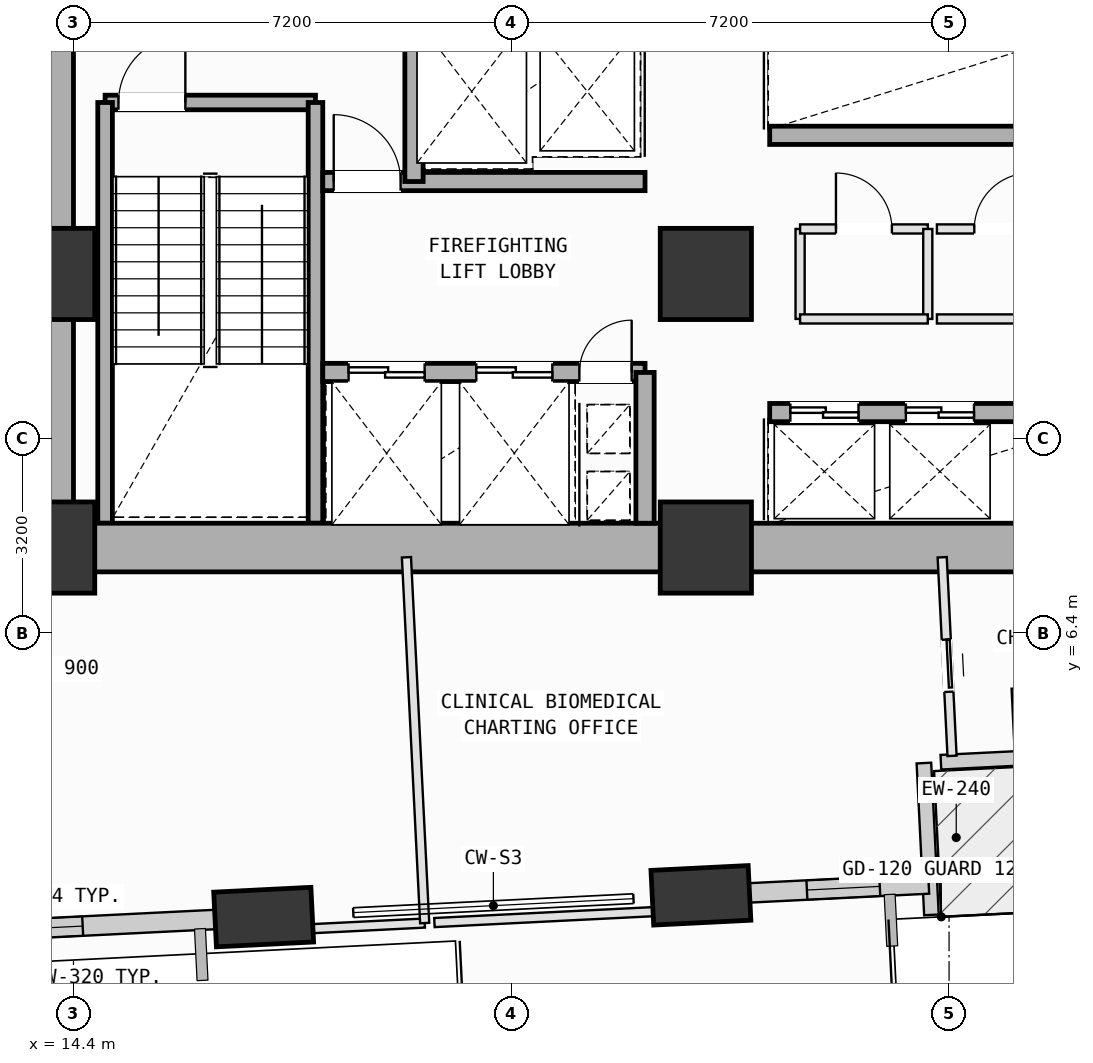
"""IFC4 building model, lengths in metres.
Left out: names, types, materials, properties, quantities, classifications, styles, units other than length and angle.
Written with IfcOpenShell. Run it as: python <this file> out.ifc"""

import sys

from ifc_helpers import new_model, si_unit, direction, frame, frame_2d, origin, origin_2d, place, context, subcontext, project, spatial, rectangle, extrude, element, fill, save


model = new_model("IFC4")
c1 = context("Model", 3, precision=1e-05, world=origin(), true_north=direction((0.0, 1.0)))
c2 = subcontext(c1, "Body", "Model", "MODEL_VIEW")
j1 = project(units=[si_unit("LENGTHUNIT", "METRE"), si_unit("PLANEANGLEUNIT", "RADIAN")], contexts=[c1])
p1 = place(None, origin())
s1 = spatial("IfcSite", under=j1, at=p1, CompositionType="ELEMENT")
p2 = place(p1, origin())
s2 = spatial("IfcBuilding", under=s1, at=p2, CompositionType="ELEMENT")
p3 = place(p2, frame((0.0, 0.0, 35.0)))
s3 = spatial("IfcBuildingStorey", under=s2, at=p3, CompositionType="ELEMENT", Elevation=35.0)
for number, where, z_axis, x_axis in (
    (1, (14.0, 7.8, 0.0), (0.0, 0.0, 1.0), (1.0, 0.0, 0.0)),
    (2, (14.0, 12.3, 0.0), (0.0, 0.0, 1.0), (1.0, 0.0, 0.0)),
    (3, (24.8, 7.8, 0.0), (0.0, 0.0, 1.0), (1.0, 0.0, 0.0)),
    (4, (24.8, 12.3, 0.0), (0.0, 0.0, 1.0), (1.0, 0.0, 0.0)),
):
    element("IfcColumn", number, at=place(p3, frame(where, z_axis=z_axis, x_axis=x_axis)), inside=s3, PredefinedType="COLUMN", context=c2, shape_type="SweptSolid", body=[
        extrude(rectangle(XDim=1.5, YDim=1.5, at=origin_2d()), origin(), (0.0, 0.0, 1.0), 4.0),
    ])
p4 = place(p3, frame((17.528, 1.722, 0.002), z_axis=(0.095565628667, -0.065348687031, 0.993275772241), x_axis=(0.522993171895, 0.85231743292, 0.005756360997)))
e5 = element("IfcColumn", 5, at=p4, inside=s3, PredefinedType="COLUMN", context=c2, shape_type="SweptSolid", body=[
    extrude(rectangle(XDim=1.6, YDim=0.9, at=origin_2d()), origin(), (0.0, 0.0, 1.0), 4.024),
])
p5 = place(p3, frame((24.719, 2.08, 0.002), z_axis=(0.094022453449, -0.035858595691, 0.994924087236), x_axis=(0.309684632401, 0.950826164268, 0.005003378778)))
e6 = element("IfcColumn", 6, at=p5, inside=s3, PredefinedType="COLUMN", context=c2, shape_type="SweptSolid", body=[
    extrude(rectangle(XDim=1.6, YDim=0.9, at=origin_2d()), origin(), (0.0, 0.0, 1.0), 4.017),
])
p6 = place(p3, frame((35.617, 4.615, 0.0), z_axis=(0.0, 0.0, 1.0), x_axis=(-0.998763945983, -0.04970493139, 0.0)))
e7 = element("IfcWall", 7, at=p6, inside=s3, PredefinedType="SOLIDWALL", context=c2, shape_type="SweptSolid", body=[
    extrude(rectangle(XDim=6.96, YDim=0.24, at=frame_2d((3.48, 0.0))), origin(), (0.0, 0.0, 1.0), 3.165),
])
p7 = place(p6, frame((4.264, 0.0, 0.0)))
e8 = element("IfcOpeningElement", 8, at=p7, cuts=e7, PredefinedType="OPENING", context=c2, shape_type="SweptSolid", body=[
    extrude(rectangle(XDim=1.1, YDim=2.15, at=frame_2d((0.55, 1.075))), frame((0.0, 0.13, 0.0), z_axis=(0.0, -1.0, 0.0), x_axis=(1.0, 0.0, 0.0)), (0.0, 0.0, 1.0), 0.26),
])
p8 = place(p3, frame((28.386, 4.255, 0.0), z_axis=(0.0, 0.0, 1.0), x_axis=(0.049801248091, -0.998759147987, 0.0)))
e9 = element("IfcWall", 9, at=p8, inside=s3, PredefinedType="SOLIDWALL", context=c2, shape_type="SweptSolid", body=[
    extrude(rectangle(XDim=2.5, YDim=0.24, at=frame_2d((1.25, 0.0))), origin(), (0.0, 0.0, 1.0), 3.165),
])
p9 = place(p3, frame((17.122, 1.702, 0.0), z_axis=(0.0, 0.0, 1.0), x_axis=(-0.998763010787, -0.049723719528, 0.0)))
e10 = element("IfcWall", 10, at=p9, inside=s3, PredefinedType="SOLIDWALL", context=c2, shape_type="SweptSolid", body=[
    extrude(rectangle(XDim=6.034, YDim=0.32, at=frame_2d((3.017, 0.0))), origin(), (0.0, 0.0, 1.0), 3.165),
])
p10 = place(p9, frame((2.574, 0.0, 0.75)))
e11 = element("IfcOpeningElement", 11, at=p10, cuts=e10, PredefinedType="OPENING", context=c2, shape_type="SweptSolid", body=[
    extrude(rectangle(XDim=1.8, YDim=2.05, at=frame_2d((0.9, 1.025))), frame((0.0, 0.17, 0.0), z_axis=(0.0, -1.0, 0.0), x_axis=(1.0, 0.0, 0.0)), (0.0, 0.0, 1.0), 0.34),
])
p11 = place(p3, frame((28.465, 2.267, 0.0), z_axis=(0.0, 0.0, 1.0), x_axis=(-0.998761361594, -0.049756834576, 0.0)))
e12 = element("IfcWall", 12, at=p11, inside=s3, PredefinedType="SOLIDWALL", context=c2, shape_type="SweptSolid", body=[
    extrude(rectangle(XDim=2.964, YDim=0.32, at=frame_2d((1.482, 0.0))), origin(), (0.0, 0.0, 1.0), 3.145),
])
p12 = place(p11, frame((0.805, 0.0, 0.75)))
e13 = element("IfcOpeningElement", 13, at=p12, cuts=e12, PredefinedType="OPENING", context=c2, shape_type="SweptSolid", body=[
    extrude(rectangle(XDim=1.2, YDim=1.75, at=frame_2d((0.6, 0.875))), frame((0.0, 0.17, 0.0), z_axis=(0.0, -1.0, 0.0), x_axis=(1.0, 0.0, 0.0)), (0.0, 0.0, 1.0), 0.34),
])
p13 = place(p3, frame((14.92, 15.12, 0.0), z_axis=(0.0, 0.0, 1.0), x_axis=(1.0, 0.0, 0.0)))
e14 = element("IfcWall", 14, at=p13, inside=s3, PredefinedType="SOLIDWALL", context=c2, shape_type="SweptSolid", body=[
    extrude(rectangle(XDim=3.46, YDim=0.24, at=frame_2d((1.73, 0.0))), origin(), (0.0, 0.0, 1.0), 3.78),
])
p14 = place(p13, frame((0.22, 0.0, 0.0)))
e15 = element("IfcOpeningElement", 15, at=p14, cuts=e14, PredefinedType="OPENING", context=c2, shape_type="SweptSolid", body=[
    extrude(rectangle(XDim=1.1, YDim=2.15, at=frame_2d((0.55, 1.075))), frame((0.0, 0.13, 0.0), z_axis=(0.0, -1.0, 0.0), x_axis=(1.0, 0.0, 0.0)), (0.0, 0.0, 1.0), 0.26),
])
for number, where, z_axis, x_axis in (
    (16, (18.38, 15.12, 0.0), (0.0, 0.0, 1.0), (0.0, -1.0, 0.0)),
    (17, (14.92, 8.2, 0.0), (0.0, 0.0, 1.0), (0.0, 1.0, 0.0)),
):
    element("IfcWall", number, at=place(p3, frame(where, z_axis=z_axis, x_axis=x_axis)), inside=s3, PredefinedType="SOLIDWALL", context=c2, shape_type="SweptSolid", body=[
        extrude(rectangle(XDim=6.92, YDim=0.24, at=frame_2d((3.46, 0.0))), origin(), (0.0, 0.0, 1.0), 3.78),
    ])
for number, where, z_axis, x_axis in (
    (18, (14.0, 7.8, 0.0), (0.0, 0.0, 1.0), (1.0, 0.0, 0.0)),
    (19, (24.8, 7.8, 0.0), (0.0, 0.0, 1.0), (1.0, 0.0, 0.0)),
):
    element("IfcWall", number, at=place(p3, frame(where, z_axis=z_axis, x_axis=x_axis)), inside=s3, PredefinedType="SHEAR", context=c2, shape_type="SweptSolid", body=[
        extrude(rectangle(XDim=10.8, YDim=0.8, at=frame_2d((5.4, 0.0))), origin(), (0.0, 0.0, 1.0), 3.78),
    ])
p15 = place(p3, frame((14.0, 16.8, 0.0), z_axis=(0.0, 0.0, 1.0), x_axis=(0.0, -1.0, 0.0)))
e20 = element("IfcWall", 20, at=p15, inside=s3, PredefinedType="SHEAR", context=c2, shape_type="SweptSolid", body=[
    extrude(rectangle(XDim=9.0, YDim=0.8, at=frame_2d((4.5, 0.0))), origin(), (0.0, 0.0, 1.0), 3.78),
])
p16 = place(p3, frame((18.5, 10.68, 0.0), z_axis=(0.0, 0.0, 1.0), x_axis=(1.0, 0.0, 0.0)))
e21 = element("IfcWall", 21, at=p16, inside=s3, PredefinedType="SOLIDWALL", context=c2, shape_type="SweptSolid", body=[
    extrude(rectangle(XDim=5.3, YDim=0.3, at=frame_2d((2.65, 0.0))), origin(), (0.0, 0.0, 1.0), 3.78),
])
p17 = place(p16, frame((4.22, 0.0, 0.0)))
e22 = element("IfcOpeningElement", 22, at=p17, cuts=e21, PredefinedType="OPENING", context=c2, shape_type="SweptSolid", body=[
    extrude(rectangle(XDim=0.86, YDim=2.06, at=frame_2d((0.43, 1.03))), frame((0.0, 0.16, 0.0), z_axis=(0.0, -1.0, 0.0), x_axis=(1.0, 0.0, 0.0)), (0.0, 0.0, 1.0), 0.32),
])
p18 = place(p16, frame((0.425, 0.0, 0.0)))
e23 = element("IfcOpeningElement", 23, at=p18, cuts=e21, PredefinedType="OPENING", context=c2, shape_type="SweptSolid", body=[
    extrude(rectangle(XDim=1.25, YDim=2.18, at=frame_2d((0.625, 1.09))), frame((0.0, 0.16, 0.0), z_axis=(0.0, -1.0, 0.0), x_axis=(1.0, 0.0, 0.0)), (0.0, 0.0, 1.0), 0.32),
])
p19 = place(p16, frame((2.525, 0.0, 0.0)))
e24 = element("IfcOpeningElement", 24, at=p19, cuts=e21, PredefinedType="OPENING", context=c2, shape_type="SweptSolid", body=[
    extrude(rectangle(XDim=1.25, YDim=2.18, at=frame_2d((0.625, 1.09))), frame((0.0, 0.16, 0.0), z_axis=(0.0, -1.0, 0.0), x_axis=(1.0, 0.0, 0.0)), (0.0, 0.0, 1.0), 0.32),
])
p20 = place(p3, frame((18.5, 13.82, 0.0), z_axis=(0.0, 0.0, 1.0), x_axis=(1.0, 0.0, 0.0)))
e25 = element("IfcWall", 25, at=p20, inside=s3, PredefinedType="SOLIDWALL", context=c2, shape_type="SweptSolid", body=[
    extrude(rectangle(XDim=5.3, YDim=0.3, at=frame_2d((2.65, 0.0))), origin(), (0.0, 0.0, 1.0), 3.78),
])
p21 = place(p20, frame((0.18, 0.0, 0.0)))
e26 = element("IfcOpeningElement", 26, at=p21, cuts=e25, PredefinedType="OPENING", context=c2, shape_type="SweptSolid", body=[
    extrude(rectangle(XDim=1.1, YDim=2.15, at=frame_2d((0.55, 1.075))), frame((0.0, 0.16, 0.0), z_axis=(0.0, -1.0, 0.0), x_axis=(1.0, 0.0, 0.0)), (0.0, 0.0, 1.0), 0.32),
])
p22 = place(p3, frame((23.8, 8.2, 0.0), z_axis=(0.0, 0.0, 1.0), x_axis=(0.0, 1.0, 0.0)))
e27 = element("IfcWall", 27, at=p22, inside=s3, PredefinedType="SOLIDWALL", context=c2, shape_type="SweptSolid", body=[
    extrude(rectangle(XDim=2.48, YDim=0.3, at=frame_2d((1.24, 0.0))), origin(), (0.0, 0.0, 1.0), 3.78),
])
p23 = place(p3, frame((20.0, 13.82, 0.0), z_axis=(0.0, 0.0, 1.0), x_axis=(0.0, 1.0, 0.0)))
e28 = element("IfcWall", 28, at=p23, inside=s3, PredefinedType="SOLIDWALL", context=c2, shape_type="SweptSolid", body=[
    extrude(rectangle(XDim=2.73, YDim=0.3, at=frame_2d((1.365, 0.0))), origin(), (0.0, 0.0, 1.0), 3.78),
])
p24 = place(p3, frame((25.85, 10.02, 0.0), z_axis=(0.0, 0.0, 1.0), x_axis=(1.0, 0.0, 0.0)))
e29 = element("IfcWall", 29, at=p24, inside=s3, PredefinedType="SOLIDWALL", context=c2, shape_type="SweptSolid", body=[
    extrude(rectangle(XDim=5.45, YDim=0.3, at=frame_2d((2.725, 0.0))), origin(), (0.0, 0.0, 1.0), 3.78),
])
p25 = place(p24, frame((0.34, 0.0, 0.0)))
e30 = element("IfcOpeningElement", 30, at=p25, cuts=e29, PredefinedType="OPENING", context=c2, shape_type="SweptSolid", body=[
    extrude(rectangle(XDim=1.12, YDim=2.15, at=frame_2d((0.56, 1.075))), frame((0.0, 0.16, 0.0), z_axis=(0.0, -1.0, 0.0), x_axis=(1.0, 0.0, 0.0)), (0.0, 0.0, 1.0), 0.32),
])
p26 = place(p24, frame((2.24, 0.0, 0.0)))
e31 = element("IfcOpeningElement", 31, at=p26, cuts=e29, PredefinedType="OPENING", context=c2, shape_type="SweptSolid", body=[
    extrude(rectangle(XDim=1.12, YDim=2.15, at=frame_2d((0.56, 1.075))), frame((0.0, 0.16, 0.0), z_axis=(0.0, -1.0, 0.0), x_axis=(1.0, 0.0, 0.0)), (0.0, 0.0, 1.0), 0.32),
])
p27 = place(p3, frame((25.85, 14.58, 0.0), z_axis=(0.0, 0.0, 1.0), x_axis=(1.0, 0.0, 0.0)))
e32 = element("IfcWall", 32, at=p27, inside=s3, PredefinedType="SOLIDWALL", context=c2, shape_type="SweptSolid", body=[
    extrude(rectangle(XDim=5.45, YDim=0.3, at=frame_2d((2.725, 0.0))), origin(), (0.0, 0.0, 1.0), 3.78),
])
p28 = place(p3, frame((26.35, 11.56, 0.0), z_axis=(0.0, 0.0, 1.0), x_axis=(0.0, 1.0, 0.0)))
e33 = element("IfcWall", 33, at=p28, inside=s3, PredefinedType="PARTITIONING", context=c2, shape_type="SweptSolid", body=[
    extrude(rectangle(XDim=1.48, YDim=0.15, at=frame_2d((0.74, 0.0))), origin(), (0.0, 0.0, 1.0), 3.78),
])
p29 = place(p3, frame((26.35, 13.04, 0.0), z_axis=(0.0, 0.0, 1.0), x_axis=(1.0, 0.0, 0.0)))
e34 = element("IfcWall", 34, at=p29, inside=s3, PredefinedType="PARTITIONING", context=c2, shape_type="SweptSolid", body=[
    extrude(rectangle(XDim=2.1, YDim=0.15, at=frame_2d((1.05, 0.0))), origin(), (0.0, 0.0, 1.0), 3.78),
])
p30 = place(p29, frame((0.59, 0.0, 0.0)))
e35 = element("IfcOpeningElement", 35, at=p30, cuts=e34, PredefinedType="OPENING", context=c2, shape_type="SweptSolid", body=[
    extrude(rectangle(XDim=0.92, YDim=2.1, at=frame_2d((0.46, 1.05))), frame((0.0, 0.085, 0.0), z_axis=(0.0, -1.0, 0.0), x_axis=(1.0, 0.0, 0.0)), (0.0, 0.0, 1.0), 0.17),
])
p31 = place(p3, frame((28.45, 13.04, 0.0), z_axis=(0.0, 0.0, 1.0), x_axis=(0.0, -1.0, 0.0)))
e36 = element("IfcWall", 36, at=p31, inside=s3, PredefinedType="PARTITIONING", context=c2, shape_type="SweptSolid", body=[
    extrude(rectangle(XDim=1.48, YDim=0.15, at=frame_2d((0.74, 0.0))), origin(), (0.0, 0.0, 1.0), 3.78),
])
p32 = place(p3, frame((28.45, 11.56, 0.0), z_axis=(0.0, 0.0, 1.0), x_axis=(-1.0, 0.0, 0.0)))
e37 = element("IfcWall", 37, at=p32, inside=s3, PredefinedType="PARTITIONING", context=c2, shape_type="SweptSolid", body=[
    extrude(rectangle(XDim=2.1, YDim=0.15, at=frame_2d((1.05, 0.0))), origin(), (0.0, 0.0, 1.0), 3.78),
])
p33 = place(p3, frame((28.6, 13.04, 0.0), z_axis=(0.0, 0.0, 1.0), x_axis=(1.0, 0.0, 0.0)))
e38 = element("IfcWall", 38, at=p33, inside=s3, PredefinedType="PARTITIONING", context=c2, shape_type="SweptSolid", body=[
    extrude(rectangle(XDim=2.15, YDim=0.15, at=frame_2d((1.075, 0.0))), origin(), (0.0, 0.0, 1.0), 3.78),
])
p34 = place(p33, frame((0.615, 0.0, 0.0)))
e39 = element("IfcOpeningElement", 39, at=p34, cuts=e38, PredefinedType="OPENING", context=c2, shape_type="SweptSolid", body=[
    extrude(rectangle(XDim=0.92, YDim=2.1, at=frame_2d((0.46, 1.05))), frame((0.0, 0.085, 0.0), z_axis=(0.0, -1.0, 0.0), x_axis=(1.0, 0.0, 0.0)), (0.0, 0.0, 1.0), 0.17),
])
p35 = place(p3, frame((30.75, 11.56, 0.0), z_axis=(0.0, 0.0, 1.0), x_axis=(-1.0, 0.0, 0.0)))
e40 = element("IfcWall", 40, at=p35, inside=s3, PredefinedType="PARTITIONING", context=c2, shape_type="SweptSolid", body=[
    extrude(rectangle(XDim=2.15, YDim=0.15, at=frame_2d((1.075, 0.0))), origin(), (0.0, 0.0, 1.0), 3.78),
])
p36 = place(p3, frame((20.176, 1.624, 0.0), z_axis=(0.0, 0.0, 1.0), x_axis=(-0.998752338878, -0.049937616944, 0.0)))
e41 = element("IfcWall", 41, at=p36, inside=s3, PredefinedType="PARTITIONING", context=c2, shape_type="SweptSolid", body=[
    extrude(rectangle(XDim=3.046, YDim=0.15, at=frame_2d((1.523, 0.0))), origin(), (0.0, 0.0, 1.0), 3.165),
])
p37 = place(p3, frame((19.876, 7.64, 0.0), z_axis=(0.0, 0.0, 1.0), x_axis=(0.049814301078, -0.998758497039, 0.0)))
e42 = element("IfcWall", 42, at=p37, inside=s3, PredefinedType="PARTITIONING", context=c2, shape_type="SweptSolid", body=[
    extrude(rectangle(XDim=6.023, YDim=0.15, at=frame_2d((3.012, 0.0))), origin(), (0.0, 0.0, 1.0), 3.78),
])
p38 = place(p3, frame((24.57, 1.843, 0.0), z_axis=(0.0, 0.0, 1.0), x_axis=(-0.998761370092, -0.049756664, 0.0)))
e43 = element("IfcWall", 43, at=p38, inside=s3, PredefinedType="PARTITIONING", context=c2, shape_type="SweptSolid", body=[
    extrude(rectangle(XDim=4.24, YDim=0.15, at=frame_2d((2.12, 0.0))), origin(), (0.0, 0.0, 1.0), 3.165),
])
p39 = place(p3, frame((25.517, 1.89, 0.0), z_axis=(0.0, 0.0, 1.0), x_axis=(-0.998786100196, -0.049257751219, 0.0)))
e44 = element("IfcWall", 44, at=p39, inside=s3, PredefinedType="PARTITIONING", context=c2, shape_type="SweptSolid", body=[
    extrude(rectangle(XDim=0.788, YDim=0.15, at=frame_2d((0.394, 0.0))), origin(), (0.0, 0.0, 1.0), 3.145),
])
p40 = place(p3, frame((28.687, 7.64, 0.0), z_axis=(0.0, 0.0, 1.0), x_axis=(0.049576399936, -0.998770334246, 0.0)))
e45 = element("IfcWall", 45, at=p40, inside=s3, PredefinedType="PARTITIONING", context=c2, shape_type="SweptSolid", body=[
    extrude(rectangle(XDim=3.27, YDim=0.15, at=frame_2d((1.635, 0.0))), origin(), (0.0, 0.0, 1.0), 3.78),
])
p41 = place(p40, frame((1.355, 0.0, 0.0)))
e46 = element("IfcOpeningElement", 46, at=p41, cuts=e45, PredefinedType="OPENING", context=c2, shape_type="SweptSolid", body=[
    extrude(rectangle(XDim=0.86, YDim=2.06, at=frame_2d((0.43, 1.03))), frame((0.0, 0.085, 0.0), z_axis=(0.0, -1.0, 0.0), x_axis=(1.0, 0.0, 0.0)), (0.0, 0.0, 1.0), 0.17),
])
p42 = place(p3, frame((29.903, 5.482, 0.0), z_axis=(0.0, 0.0, 1.0), x_axis=(0.049325464305, -0.998782758447, 0.0)))
e47 = element("IfcWall", 47, at=p42, inside=s3, PredefinedType="PARTITIONING", context=c2, shape_type="SweptSolid", body=[
    extrude(rectangle(XDim=1.054, YDim=0.15, at=frame_2d((0.527, 0.0))), origin(), (0.0, 0.0, 1.0), 3.78),
])
p43 = place(p10, origin())
e48 = element("IfcWindow", 48, at=p43, inside=s3, PartitioningType="SINGLE_PANEL", PredefinedType="WINDOW", context=c2, shape_type="SweptSolid", body=[
    extrude(rectangle(XDim=1.8, YDim=2.05, at=frame_2d((0.9, 1.025))), frame((0.0, 0.03, 0.0), z_axis=(0.0, -1.0, 0.0), x_axis=(1.0, 0.0, 0.0)), (0.0, 0.0, 1.0), 0.06),
])
fill(e11, e48)
p44 = place(p12, origin())
e49 = element("IfcWindow", 49, at=p44, inside=s3, PartitioningType="SINGLE_PANEL", PredefinedType="WINDOW", context=c2, shape_type="SweptSolid", body=[
    extrude(rectangle(XDim=1.2, YDim=1.75, at=frame_2d((0.6, 0.875))), frame((0.0, 0.03, 0.0), z_axis=(0.0, -1.0, 0.0), x_axis=(1.0, 0.0, 0.0)), (0.0, 0.0, 1.0), 0.06),
])
fill(e13, e49)
p45 = place(p14, origin())
e50 = element("IfcDoor", 50, at=p45, inside=s3, OperationType="SINGLE_SWING_RIGHT", PredefinedType="DOOR", context=c2, shape_type="SweptSolid", body=[
    extrude(rectangle(XDim=1.1, YDim=2.15, at=frame_2d((0.55, 1.075))), frame((0.0, 0.025, 0.0), z_axis=(0.0, -1.0, 0.0), x_axis=(1.0, 0.0, 0.0)), (0.0, 0.0, 1.0), 0.05),
])
fill(e15, e50)
p46 = place(p17, origin())
e51 = element("IfcDoor", 51, at=p46, inside=s3, OperationType="SINGLE_SWING_RIGHT", PredefinedType="DOOR", context=c2, shape_type="SweptSolid", body=[
    extrude(rectangle(XDim=0.86, YDim=2.06, at=frame_2d((0.43, 1.03))), frame((0.0, 0.025, 0.0), z_axis=(0.0, -1.0, 0.0), x_axis=(1.0, 0.0, 0.0)), (0.0, 0.0, 1.0), 0.05),
])
fill(e22, e51)
p47 = place(p21, origin())
e52 = element("IfcDoor", 52, at=p47, inside=s3, OperationType="SINGLE_SWING_LEFT", PredefinedType="DOOR", context=c2, shape_type="SweptSolid", body=[
    extrude(rectangle(XDim=1.1, YDim=2.15, at=frame_2d((0.55, 1.075))), frame((0.0, 0.025, 0.0), z_axis=(0.0, -1.0, 0.0), x_axis=(1.0, 0.0, 0.0)), (0.0, 0.0, 1.0), 0.05),
])
fill(e26, e52)
p48 = place(p18, origin())
e53 = element("IfcDoor", 53, at=p48, inside=s3, OperationType="DOUBLE_DOOR_SLIDING", PredefinedType="DOOR", context=c2, shape_type="SweptSolid", body=[
    extrude(rectangle(XDim=1.25, YDim=2.18, at=frame_2d((0.625, 1.09))), frame((0.0, 0.025, 0.0), z_axis=(0.0, -1.0, 0.0), x_axis=(1.0, 0.0, 0.0)), (0.0, 0.0, 1.0), 0.05),
])
fill(e23, e53)
p49 = place(p19, origin())
e54 = element("IfcDoor", 54, at=p49, inside=s3, OperationType="DOUBLE_DOOR_SLIDING", PredefinedType="DOOR", context=c2, shape_type="SweptSolid", body=[
    extrude(rectangle(XDim=1.25, YDim=2.18, at=frame_2d((0.625, 1.09))), frame((0.0, 0.025, 0.0), z_axis=(0.0, -1.0, 0.0), x_axis=(1.0, 0.0, 0.0)), (0.0, 0.0, 1.0), 0.05),
])
fill(e24, e54)
p50 = place(p25, origin())
e55 = element("IfcDoor", 55, at=p50, inside=s3, OperationType="DOUBLE_DOOR_SLIDING", PredefinedType="DOOR", context=c2, shape_type="SweptSolid", body=[
    extrude(rectangle(XDim=1.12, YDim=2.15, at=frame_2d((0.56, 1.075))), frame((0.0, 0.025, 0.0), z_axis=(0.0, -1.0, 0.0), x_axis=(1.0, 0.0, 0.0)), (0.0, 0.0, 1.0), 0.05),
])
fill(e30, e55)
p51 = place(p26, origin())
e56 = element("IfcDoor", 56, at=p51, inside=s3, OperationType="DOUBLE_DOOR_SLIDING", PredefinedType="DOOR", context=c2, shape_type="SweptSolid", body=[
    extrude(rectangle(XDim=1.12, YDim=2.15, at=frame_2d((0.56, 1.075))), frame((0.0, 0.025, 0.0), z_axis=(0.0, -1.0, 0.0), x_axis=(1.0, 0.0, 0.0)), (0.0, 0.0, 1.0), 0.05),
])
fill(e31, e56)
p52 = place(p30, origin())
e57 = element("IfcDoor", 57, at=p52, inside=s3, OperationType="SINGLE_SWING_LEFT", PredefinedType="DOOR", context=c2, shape_type="SweptSolid", body=[
    extrude(rectangle(XDim=0.92, YDim=2.1, at=frame_2d((0.46, 1.05))), frame((0.0, 0.025, 0.0), z_axis=(0.0, -1.0, 0.0), x_axis=(1.0, 0.0, 0.0)), (0.0, 0.0, 1.0), 0.05),
])
fill(e35, e57)
p53 = place(p34, origin())
e58 = element("IfcDoor", 58, at=p53, inside=s3, OperationType="SINGLE_SWING_RIGHT", PredefinedType="DOOR", context=c2, shape_type="SweptSolid", body=[
    extrude(rectangle(XDim=0.92, YDim=2.1, at=frame_2d((0.46, 1.05))), frame((0.0, 0.025, 0.0), z_axis=(0.0, -1.0, 0.0), x_axis=(1.0, 0.0, 0.0)), (0.0, 0.0, 1.0), 0.05),
])
fill(e39, e58)
p54 = place(p41, origin())
e59 = element("IfcDoor", 59, at=p54, inside=s3, OperationType="SLIDING_TO_LEFT", PredefinedType="DOOR", context=c2, shape_type="SweptSolid", body=[
    extrude(rectangle(XDim=0.86, YDim=2.06, at=frame_2d((0.43, 1.03))), frame((0.0, 0.025, 0.0), z_axis=(0.0, -1.0, 0.0), x_axis=(1.0, 0.0, 0.0)), (0.0, 0.0, 1.0), 0.05),
])
fill(e46, e59)
save(model, sys.argv[1])
